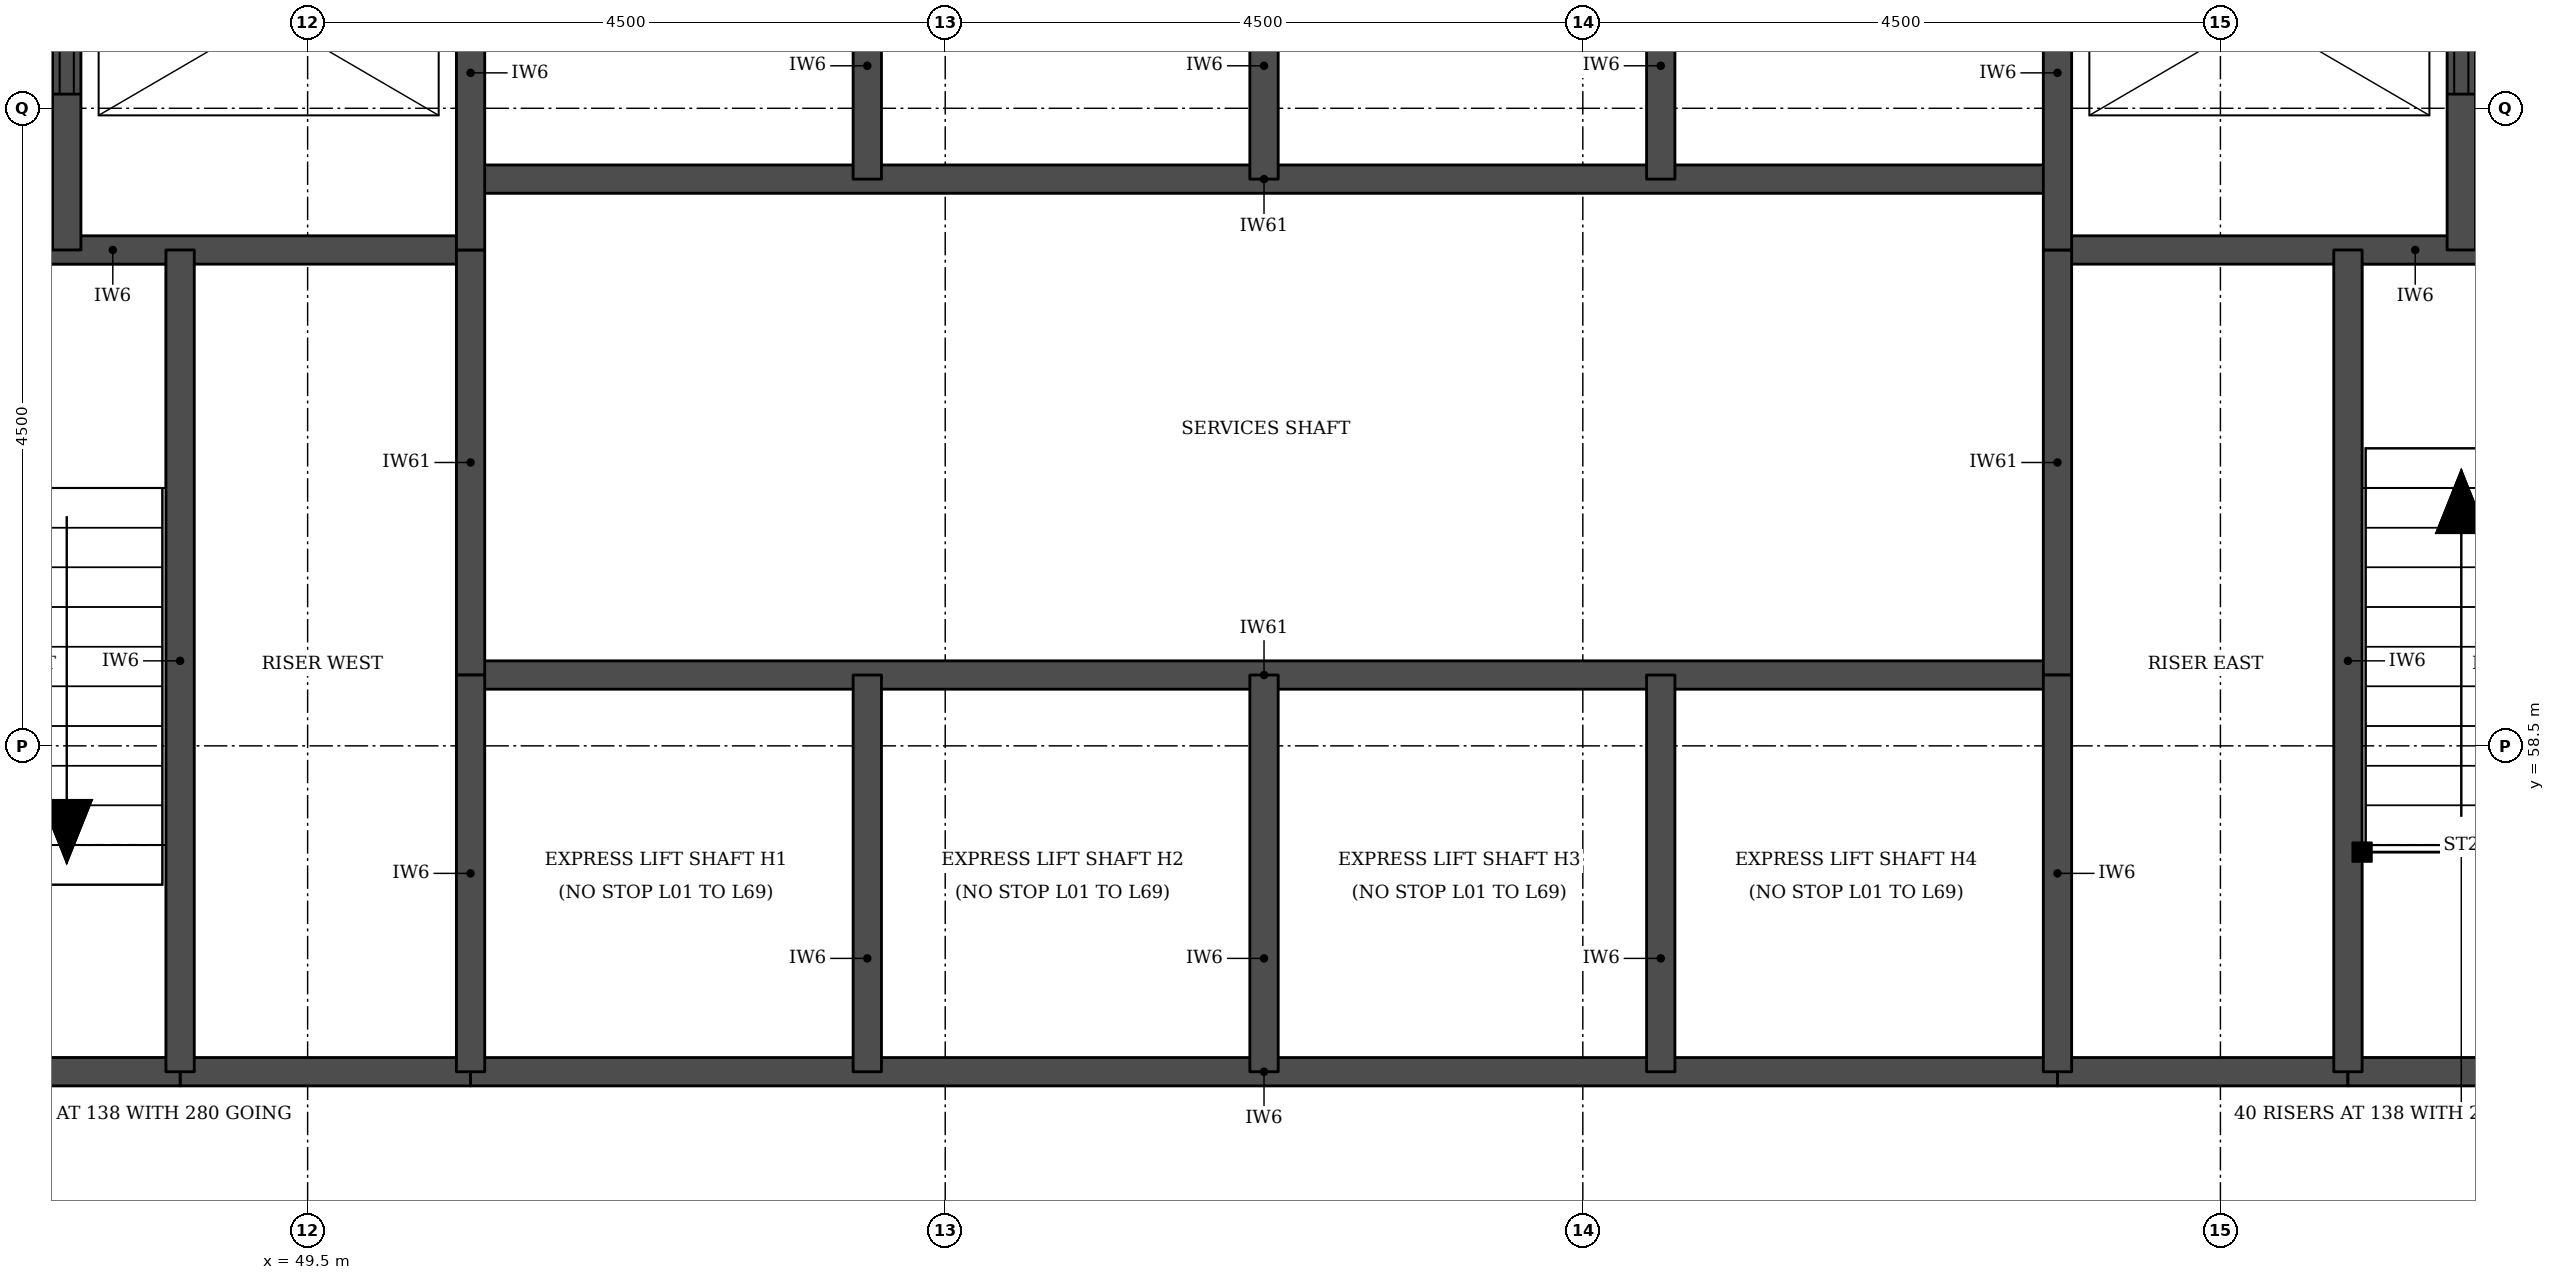
"""IFC4 building model, lengths in metres.
Left out: names, types, materials, properties, quantities, classifications, styles, units other than length and angle.
Written with IfcOpenShell. Run it as: python <this file> out.ifc"""

import sys

from ifc_helpers import new_model, si_unit, direction, frame, frame_2d, origin, place, context, subcontext, project, spatial, rectangle, extrude, element, fill, save


model = new_model("IFC4")
c1 = context("Model", 3, precision=1e-05, world=origin(), true_north=direction((0.0, 1.0)))
c2 = subcontext(c1, "Body", "Model", "MODEL_VIEW")
j1 = project(units=[si_unit("LENGTHUNIT", "METRE"), si_unit("PLANEANGLEUNIT", "RADIAN")], contexts=[c1])
p1 = place(None, origin())
s1 = spatial("IfcSite", under=j1, at=p1, CompositionType="ELEMENT")
p2 = place(p1, origin())
s2 = spatial("IfcBuilding", under=s1, at=p2, CompositionType="ELEMENT")
p3 = place(p2, frame((0.0, 0.0, 8.0)))
s3 = spatial("IfcBuildingStorey", under=s2, at=p3, CompositionType="ELEMENT", Elevation=8.0)
for number, where, z_axis, x_axis in (
    (1, (48.6, 56.2, 0.0), (0.0, 0.0, 1.0), (1.0, 0.0, 0.0)),
    (2, (61.85, 56.2, 0.0), (0.0, 0.0, 1.0), (1.0, 0.0, 0.0)),
):
    element("IfcWall", number, at=place(p3, frame(where, z_axis=z_axis, x_axis=x_axis)), inside=s3, PredefinedType="SOLIDWALL", context=c2, shape_type="SweptSolid", body=[
        extrude(rectangle(XDim=2.05, YDim=0.2, at=frame_2d((1.025, 0.0))), origin(), (0.0, 0.0, 1.0), 5.15),
    ])
p4 = place(p3, frame((45.6, 56.2, 0.0), z_axis=(0.0, 0.0, 1.0), x_axis=(1.0, 0.0, 0.0)))
e3 = element("IfcWall", 3, at=p4, inside=s3, PredefinedType="SOLIDWALL", context=c2, shape_type="SweptSolid", body=[
    extrude(rectangle(XDim=3.0, YDim=0.2, at=frame_2d((1.5, 0.0))), origin(), (0.0, 0.0, 1.0), 5.15),
])
p5 = place(p3, frame((50.65, 56.2, 0.0), z_axis=(0.0, 0.0, 1.0), x_axis=(1.0, 0.0, 0.0)))
e4 = element("IfcWall", 4, at=p5, inside=s3, PredefinedType="SOLIDWALL", context=c2, shape_type="SweptSolid", body=[
    extrude(rectangle(XDim=11.2, YDim=0.2, at=frame_2d((5.6, 0.0))), origin(), (0.0, 0.0, 1.0), 5.15),
])
p6 = place(p3, frame((63.9, 56.2, 0.0), z_axis=(0.0, 0.0, 1.0), x_axis=(1.0, 0.0, 0.0)))
e5 = element("IfcWall", 5, at=p6, inside=s3, PredefinedType="SOLIDWALL", context=c2, shape_type="SweptSolid", body=[
    extrude(rectangle(XDim=3.0, YDim=0.2, at=frame_2d((1.5, 0.0))), origin(), (0.0, 0.0, 1.0), 5.15),
])
p7 = place(p3, frame((50.65, 59.0, 0.0), z_axis=(0.0, 0.0, 1.0), x_axis=(1.0, 0.0, 0.0)))
e6 = element("IfcWall", 6, at=p7, inside=s3, PredefinedType="SOLIDWALL", context=c2, shape_type="SweptSolid", body=[
    extrude(rectangle(XDim=11.2, YDim=0.2, at=frame_2d((5.6, 0.0))), origin(), (0.0, 0.0, 1.0), 5.5),
])
for number, where, z_axis, x_axis in (
    (7, (45.6, 62.0, 0.0), (0.0, 0.0, 1.0), (1.0, 0.0, 0.0)),
    (8, (61.85, 62.0, 0.0), (0.0, 0.0, 1.0), (1.0, 0.0, 0.0)),
):
    element("IfcWall", number, at=place(p3, frame(where, z_axis=z_axis, x_axis=x_axis)), inside=s3, PredefinedType="SOLIDWALL", context=c2, shape_type="SweptSolid", body=[
        extrude(rectangle(XDim=5.05, YDim=0.2, at=frame_2d((2.525, 0.0))), origin(), (0.0, 0.0, 1.0), 5.15),
    ])
p8 = place(p3, frame((50.65, 62.5, 0.0), z_axis=(0.0, 0.0, 1.0), x_axis=(1.0, 0.0, 0.0)))
e9 = element("IfcWall", 9, at=p8, inside=s3, PredefinedType="SOLIDWALL", context=c2, shape_type="SweptSolid", body=[
    extrude(rectangle(XDim=11.2, YDim=0.2, at=frame_2d((5.6, 0.0))), origin(), (0.0, 0.0, 1.0), 5.5),
])
p9 = place(p3, frame((47.8, 62.0, 0.0), z_axis=(0.0, 0.0, 1.0), x_axis=(0.0, 1.0, 0.0)))
e10 = element("IfcWall", 10, at=p9, inside=s3, PredefinedType="SOLIDWALL", context=c2, shape_type="SweptSolid", body=[
    extrude(rectangle(XDim=3.3, YDim=0.2, at=frame_2d((1.65, 0.0))), origin(), (0.0, 0.0, 1.0), 5.15),
])
p10 = place(p9, frame((1.1, 0.0, 0.0)))
e11 = element("IfcOpeningElement", 11, at=p10, cuts=e10, PredefinedType="OPENING", context=c2, shape_type="SweptSolid", body=[
    extrude(rectangle(XDim=1.1, YDim=2.1, at=frame_2d((0.55, 1.05))), frame((0.0, 0.11, 0.0), z_axis=(0.0, -1.0, 0.0), x_axis=(1.0, 0.0, 0.0)), (0.0, 0.0, 1.0), 0.22),
])
p11 = place(p3, frame((48.6, 56.2, 0.0), z_axis=(0.0, 0.0, 1.0), x_axis=(0.0, 1.0, 0.0)))
e12 = element("IfcWall", 12, at=p11, inside=s3, PredefinedType="SOLIDWALL", context=c2, shape_type="SweptSolid", body=[
    extrude(rectangle(XDim=5.8, YDim=0.2, at=frame_2d((2.9, 0.0))), origin(), (0.0, 0.0, 1.0), 5.15),
])
p12 = place(p3, frame((50.65, 59.0, 0.0), z_axis=(0.0, 0.0, 1.0), x_axis=(0.0, 1.0, 0.0)))
e13 = element("IfcWall", 13, at=p12, inside=s3, PredefinedType="SOLIDWALL", context=c2, shape_type="SweptSolid", body=[
    extrude(rectangle(XDim=3.0, YDim=0.2, at=frame_2d((1.5, 0.0))), origin(), (0.0, 0.0, 1.0), 5.5),
])
p13 = place(p3, frame((50.65, 56.2, 0.0), z_axis=(0.0, 0.0, 1.0), x_axis=(0.0, 1.0, 0.0)))
e14 = element("IfcWall", 14, at=p13, inside=s3, PredefinedType="SOLIDWALL", context=c2, shape_type="SweptSolid", body=[
    extrude(rectangle(XDim=2.8, YDim=0.2, at=frame_2d((1.4, 0.0))), origin(), (0.0, 0.0, 1.0), 5.15),
])
p14 = place(p3, frame((50.65, 62.0, 0.0), z_axis=(0.0, 0.0, 1.0), x_axis=(0.0, 1.0, 0.0)))
e15 = element("IfcWall", 15, at=p14, inside=s3, PredefinedType="SOLIDWALL", context=c2, shape_type="SweptSolid", body=[
    extrude(rectangle(XDim=3.3, YDim=0.2, at=frame_2d((1.65, 0.0))), origin(), (0.0, 0.0, 1.0), 5.15),
])
for number, where, z_axis, x_axis in (
    (16, (53.45, 56.2, 0.0), (0.0, 0.0, 1.0), (0.0, 1.0, 0.0)),
    (17, (53.45, 62.5, 0.0), (0.0, 0.0, 1.0), (0.0, 1.0, 0.0)),
    (18, (56.25, 56.2, 0.0), (0.0, 0.0, 1.0), (0.0, 1.0, 0.0)),
    (19, (56.25, 62.5, 0.0), (0.0, 0.0, 1.0), (0.0, 1.0, 0.0)),
    (20, (59.05, 56.2, 0.0), (0.0, 0.0, 1.0), (0.0, 1.0, 0.0)),
    (21, (59.05, 62.5, 0.0), (0.0, 0.0, 1.0), (0.0, 1.0, 0.0)),
):
    element("IfcWall", number, at=place(p3, frame(where, z_axis=z_axis, x_axis=x_axis)), inside=s3, PredefinedType="SOLIDWALL", context=c2, shape_type="SweptSolid", body=[
        extrude(rectangle(XDim=2.8, YDim=0.2, at=frame_2d((1.4, 0.0))), origin(), (0.0, 0.0, 1.0), 5.15),
    ])
p15 = place(p3, frame((61.85, 59.0, 0.0), z_axis=(0.0, 0.0, 1.0), x_axis=(0.0, 1.0, 0.0)))
e22 = element("IfcWall", 22, at=p15, inside=s3, PredefinedType="SOLIDWALL", context=c2, shape_type="SweptSolid", body=[
    extrude(rectangle(XDim=3.0, YDim=0.2, at=frame_2d((1.5, 0.0))), origin(), (0.0, 0.0, 1.0), 5.5),
])
p16 = place(p3, frame((61.85, 56.2, 0.0), z_axis=(0.0, 0.0, 1.0), x_axis=(0.0, 1.0, 0.0)))
e23 = element("IfcWall", 23, at=p16, inside=s3, PredefinedType="SOLIDWALL", context=c2, shape_type="SweptSolid", body=[
    extrude(rectangle(XDim=2.8, YDim=0.2, at=frame_2d((1.4, 0.0))), origin(), (0.0, 0.0, 1.0), 5.15),
])
p17 = place(p3, frame((61.85, 62.0, 0.0), z_axis=(0.0, 0.0, 1.0), x_axis=(0.0, 1.0, 0.0)))
e24 = element("IfcWall", 24, at=p17, inside=s3, PredefinedType="SOLIDWALL", context=c2, shape_type="SweptSolid", body=[
    extrude(rectangle(XDim=3.3, YDim=0.2, at=frame_2d((1.65, 0.0))), origin(), (0.0, 0.0, 1.0), 5.15),
])
p18 = place(p3, frame((63.9, 56.2, 0.0), z_axis=(0.0, 0.0, 1.0), x_axis=(0.0, 1.0, 0.0)))
e25 = element("IfcWall", 25, at=p18, inside=s3, PredefinedType="SOLIDWALL", context=c2, shape_type="SweptSolid", body=[
    extrude(rectangle(XDim=5.8, YDim=0.2, at=frame_2d((2.9, 0.0))), origin(), (0.0, 0.0, 1.0), 5.15),
])
p19 = place(p3, frame((64.7, 62.0, 0.0), z_axis=(0.0, 0.0, 1.0), x_axis=(0.0, 1.0, 0.0)))
e26 = element("IfcWall", 26, at=p19, inside=s3, PredefinedType="SOLIDWALL", context=c2, shape_type="SweptSolid", body=[
    extrude(rectangle(XDim=3.3, YDim=0.2, at=frame_2d((1.65, 0.0))), origin(), (0.0, 0.0, 1.0), 5.15),
])
p20 = place(p19, frame((1.1, 0.0, 0.0)))
e27 = element("IfcOpeningElement", 27, at=p20, cuts=e26, PredefinedType="OPENING", context=c2, shape_type="SweptSolid", body=[
    extrude(rectangle(XDim=1.1, YDim=2.1, at=frame_2d((0.55, 1.05))), frame((0.0, 0.11, 0.0), z_axis=(0.0, -1.0, 0.0), x_axis=(1.0, 0.0, 0.0)), (0.0, 0.0, 1.0), 0.22),
])
p21 = place(p10, origin())
e28 = element("IfcDoor", 28, at=p21, inside=s3, OperationType="DOUBLE_DOOR_SLIDING", PredefinedType="DOOR", context=c2, shape_type="SweptSolid", body=[
    extrude(rectangle(XDim=1.1, YDim=2.1, at=frame_2d((0.55, 1.05))), frame((0.0, 0.025, 0.0), z_axis=(0.0, -1.0, 0.0), x_axis=(1.0, 0.0, 0.0)), (0.0, 0.0, 1.0), 0.05),
])
fill(e11, e28)
p22 = place(p20, origin())
e29 = element("IfcDoor", 29, at=p22, inside=s3, OperationType="DOUBLE_DOOR_SLIDING", PredefinedType="DOOR", context=c2, shape_type="SweptSolid", body=[
    extrude(rectangle(XDim=1.1, YDim=2.1, at=frame_2d((0.55, 1.05))), frame((0.0, 0.025, 0.0), z_axis=(0.0, -1.0, 0.0), x_axis=(1.0, 0.0, 0.0)), (0.0, 0.0, 1.0), 0.05),
])
fill(e27, e29)
save(model, sys.argv[1])
